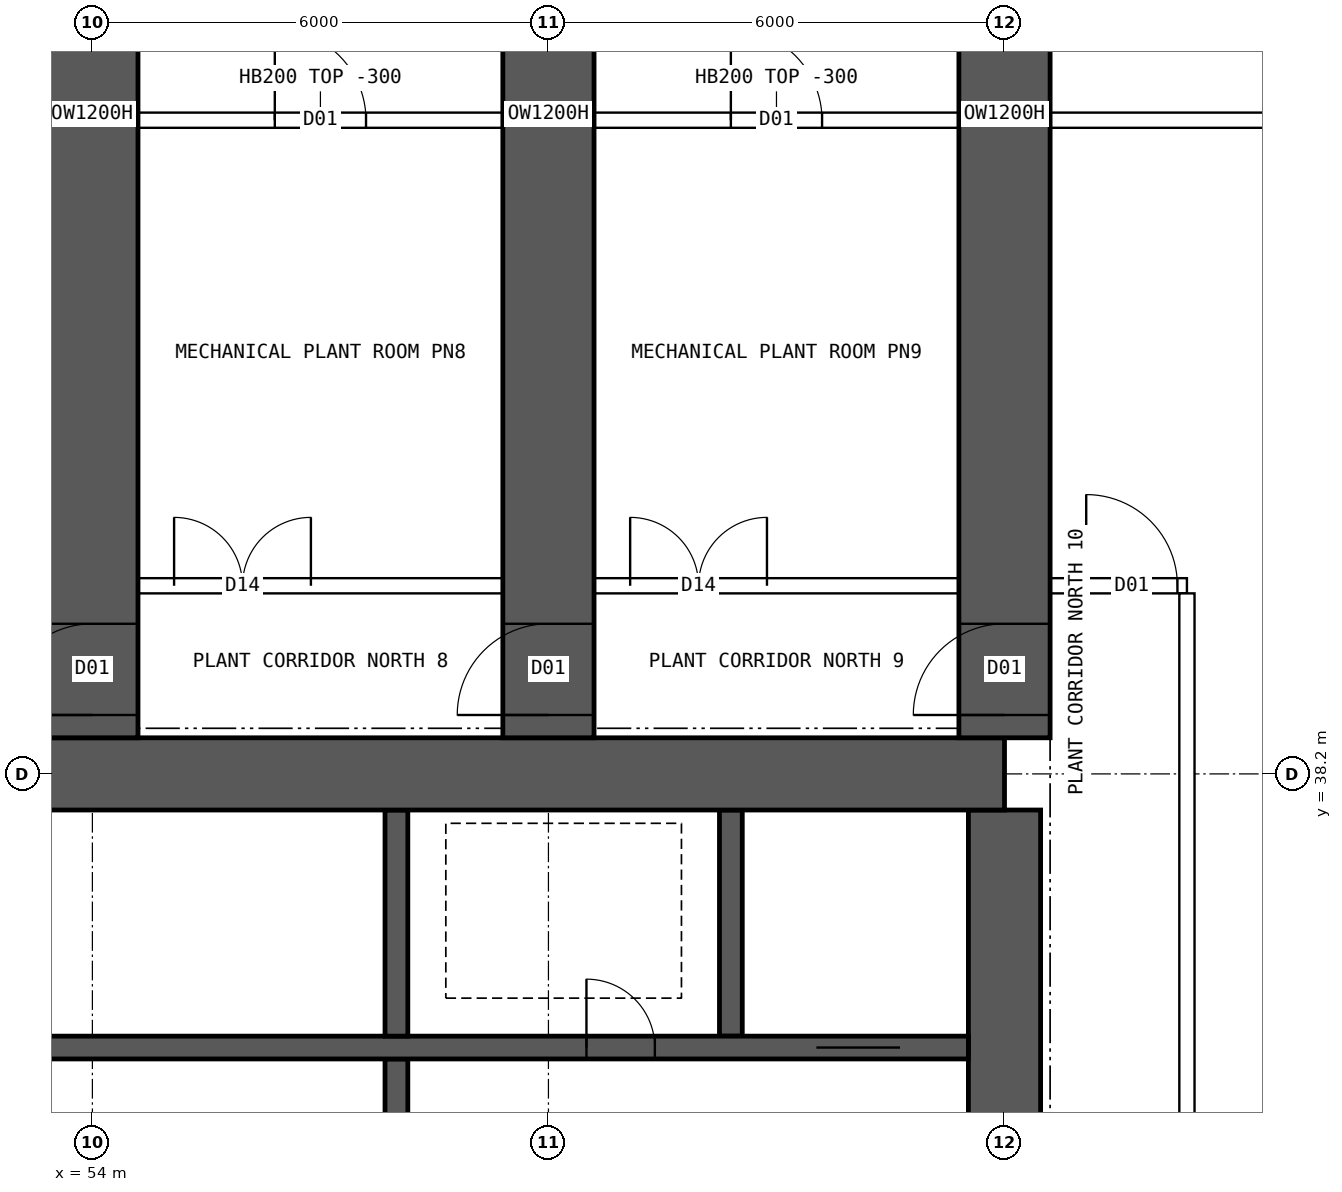
"""IFC4 building model, lengths in metres.
Left out: names, types, materials, properties, quantities, classifications, styles, units other than length and angle.
Written with IfcOpenShell. Run it as: python <this file> out.ifc"""

import sys

from ifc_helpers import new_model, si_unit, direction, frame, frame_2d, origin, place, context, subcontext, project, spatial, polyline, rectangle, outline, extrude, clip, halfspace, element, fill, save


model = new_model("IFC4")
c1 = context("Model", 3, precision=1e-05, world=origin(), true_north=direction((0.0, 1.0)))
c2 = subcontext(c1, "Body", "Model", "MODEL_VIEW")
j1 = project(units=[si_unit("LENGTHUNIT", "METRE"), si_unit("PLANEANGLEUNIT", "RADIAN")], contexts=[c1])
p1 = place(None, origin())
s1 = spatial("IfcSite", under=j1, at=p1, CompositionType="ELEMENT")
p2 = place(p1, origin())
s2 = spatial("IfcBuilding", under=s1, at=p2, CompositionType="ELEMENT")
p3 = place(p2, frame((0.0, 0.0, 133.15)))
s3 = spatial("IfcBuildingStorey", under=s2, at=p3, CompositionType="ELEMENT", Elevation=133.15)
p4 = place(p3, frame((18.0, 38.2, 0.0), z_axis=(0.0, 0.0, 1.0), x_axis=(1.0, 0.0, 0.0)))
e1 = element("IfcWall", 1, at=p4, inside=s3, PredefinedType="SHEAR", context=c2, shape_type="SweptSolid", body=[
    extrude(rectangle(XDim=48.0, YDim=0.95, at=frame_2d((24.0, 0.0))), origin(), (0.0, 0.0, 1.0), 7.2),
])
p5 = place(p3, frame((66.0, 26.275, 0.0), z_axis=(0.0, 0.0, 1.0), x_axis=(0.0, 1.0, 0.0)))
e2 = element("IfcWall", 2, at=p5, inside=s3, PredefinedType="SHEAR", context=c2, shape_type="SweptSolid", body=[
    extrude(rectangle(XDim=11.45, YDim=0.95, at=frame_2d((5.725, 0.0))), origin(), (0.0, 0.0, 1.0), 7.2),
])
p6 = place(p5, frame((5.025, 0.0, 0.0)))
e3 = element("IfcOpeningElement", 3, at=p6, cuts=e2, PredefinedType="OPENING", context=c2, shape_type="SweptSolid", body=[
    extrude(rectangle(XDim=1.2, YDim=2.1, at=frame_2d((0.6, 1.05))), frame((0.0, 0.485, 0.0), z_axis=(0.0, -1.0, 0.0), x_axis=(1.0, 0.0, 0.0)), (0.0, 0.0, 1.0), 0.97),
])
p7 = place(p3, frame((18.475, 34.6, 0.0), z_axis=(0.0, 0.0, 1.0), x_axis=(1.0, 0.0, 0.0)))
e4 = element("IfcWall", 4, at=p7, inside=s3, PredefinedType="SHEAR", context=c2, shape_type="SweptSolid", body=[
    extrude(rectangle(XDim=47.05, YDim=0.3, at=frame_2d((23.525, 0.0))), origin(), (0.0, 0.0, 1.0), 7.2),
])
p8 = place(p7, frame((0.9, 0.0, 0.0)))
e5 = element("IfcOpeningElement", 5, at=p8, cuts=e4, PredefinedType="OPENING", context=c2, shape_type="SweptSolid", body=[
    extrude(rectangle(XDim=1.1, YDim=2.1, at=frame_2d((0.55, 1.05))), frame((0.0, 0.16, 0.0), z_axis=(0.0, -1.0, 0.0), x_axis=(1.0, 0.0, 0.0)), (0.0, 0.0, 1.0), 0.32),
])
p9 = place(p7, frame((45.05, 0.0, 0.0)))
e6 = element("IfcOpeningElement", 6, at=p9, cuts=e4, PredefinedType="OPENING", context=c2, shape_type="SweptSolid", body=[
    extrude(rectangle(XDim=1.1, YDim=2.1, at=frame_2d((0.55, 1.05))), frame((0.0, 0.16, 0.0), z_axis=(0.0, -1.0, 0.0), x_axis=(1.0, 0.0, 0.0)), (0.0, 0.0, 1.0), 0.32),
])
p10 = place(p7, frame((4.125, 0.0, 0.0)))
e7 = element("IfcOpeningElement", 7, at=p10, cuts=e4, PredefinedType="OPENING", context=c2, shape_type="SweptSolid", body=[
    extrude(rectangle(XDim=0.9, YDim=2.1, at=frame_2d((0.45, 1.05))), frame((0.0, 0.16, 0.0), z_axis=(0.0, -1.0, 0.0), x_axis=(1.0, 0.0, 0.0)), (0.0, 0.0, 1.0), 0.32),
])
p11 = place(p7, frame((42.025, 0.0, 0.0)))
e8 = element("IfcOpeningElement", 8, at=p11, cuts=e4, PredefinedType="OPENING", context=c2, shape_type="SweptSolid", body=[
    extrude(rectangle(XDim=0.9, YDim=2.1, at=frame_2d((0.45, 1.05))), frame((0.0, 0.16, 0.0), z_axis=(0.0, -1.0, 0.0), x_axis=(1.0, 0.0, 0.0)), (0.0, 0.0, 1.0), 0.32),
])
p12 = place(p7, frame((8.9, 0.0, 0.0)))
e9 = element("IfcOpeningElement", 9, at=p12, cuts=e4, PredefinedType="OPENING", context=c2, shape_type="SweptSolid", body=[
    extrude(rectangle(XDim=0.9, YDim=2.1, at=frame_2d((0.45, 1.05))), frame((0.0, 0.16, 0.0), z_axis=(0.0, -1.0, 0.0), x_axis=(1.0, 0.0, 0.0)), (0.0, 0.0, 1.0), 0.32),
])
p13 = place(p7, frame((12.874, 0.0, 0.0)))
e10 = element("IfcOpeningElement", 10, at=p13, cuts=e4, PredefinedType="OPENING", context=c2, shape_type="SweptSolid", body=[
    extrude(rectangle(XDim=0.9, YDim=2.1, at=frame_2d((0.45, 1.05))), frame((0.0, 0.16, 0.0), z_axis=(0.0, -1.0, 0.0), x_axis=(1.0, 0.0, 0.0)), (0.0, 0.0, 1.0), 0.32),
])
p14 = place(p7, frame((16.521, 0.0, 0.0)))
e11 = element("IfcOpeningElement", 11, at=p14, cuts=e4, PredefinedType="OPENING", context=c2, shape_type="SweptSolid", body=[
    extrude(rectangle(XDim=0.9, YDim=2.1, at=frame_2d((0.45, 1.05))), frame((0.0, 0.16, 0.0), z_axis=(0.0, -1.0, 0.0), x_axis=(1.0, 0.0, 0.0)), (0.0, 0.0, 1.0), 0.32),
])
p15 = place(p7, frame((20.28, 0.0, 0.0)))
e12 = element("IfcOpeningElement", 12, at=p15, cuts=e4, PredefinedType="OPENING", context=c2, shape_type="SweptSolid", body=[
    extrude(rectangle(XDim=0.9, YDim=2.1, at=frame_2d((0.45, 1.05))), frame((0.0, 0.16, 0.0), z_axis=(0.0, -1.0, 0.0), x_axis=(1.0, 0.0, 0.0)), (0.0, 0.0, 1.0), 0.32),
])
p16 = place(p7, frame((24.686, 0.0, 0.0)))
e13 = element("IfcOpeningElement", 13, at=p16, cuts=e4, PredefinedType="OPENING", context=c2, shape_type="SweptSolid", body=[
    extrude(rectangle(XDim=0.9, YDim=2.1, at=frame_2d((0.45, 1.05))), frame((0.0, 0.16, 0.0), z_axis=(0.0, -1.0, 0.0), x_axis=(1.0, 0.0, 0.0)), (0.0, 0.0, 1.0), 0.32),
])
p17 = place(p7, frame((27.483, 0.0, 0.0)))
e14 = element("IfcOpeningElement", 14, at=p17, cuts=e4, PredefinedType="OPENING", context=c2, shape_type="SweptSolid", body=[
    extrude(rectangle(XDim=0.9, YDim=2.1, at=frame_2d((0.45, 1.05))), frame((0.0, 0.16, 0.0), z_axis=(0.0, -1.0, 0.0), x_axis=(1.0, 0.0, 0.0)), (0.0, 0.0, 1.0), 0.32),
])
p18 = place(p7, frame((33.604, 0.0, 0.0)))
e15 = element("IfcOpeningElement", 15, at=p18, cuts=e4, PredefinedType="OPENING", context=c2, shape_type="SweptSolid", body=[
    extrude(rectangle(XDim=0.9, YDim=2.1, at=frame_2d((0.45, 1.05))), frame((0.0, 0.16, 0.0), z_axis=(0.0, -1.0, 0.0), x_axis=(1.0, 0.0, 0.0)), (0.0, 0.0, 1.0), 0.32),
])
p19 = place(p3, frame((58.0, 30.55, 0.0), z_axis=(0.0, 0.0, 1.0), x_axis=(0.0, 1.0, 0.0)))
e16 = element("IfcWall", 16, at=p19, inside=s3, PredefinedType="SHEAR", context=c2, shape_type="SweptSolid", body=[
    extrude(rectangle(XDim=3.9, YDim=0.3, at=frame_2d((1.95, 0.0))), origin(), (0.0, 0.0, 1.0), 7.2),
])
p20 = place(p19, frame((1.4, 0.0, 0.0)))
e17 = element("IfcOpeningElement", 17, at=p20, cuts=e16, PredefinedType="OPENING", context=c2, shape_type="SweptSolid", body=[
    extrude(rectangle(XDim=1.2, YDim=2.1, at=frame_2d((0.6, 1.05))), frame((0.0, 0.16, 0.0), z_axis=(0.0, -1.0, 0.0), x_axis=(1.0, 0.0, 0.0)), (0.0, 0.0, 1.0), 0.32),
])
for number, where, z_axis, x_axis in (
    (18, (62.4, 34.75, 0.0), (0.0, 0.0, 1.0), (0.0, 1.0, 0.0)),
    (19, (58.0, 34.75, 0.0), (0.0, 0.0, 1.0), (0.0, 1.0, 0.0)),
):
    element("IfcWall", number, at=place(p3, frame(where, z_axis=z_axis, x_axis=x_axis)), inside=s3, PredefinedType="SHEAR", context=c2, shape_type="SweptSolid", body=[
        extrude(rectangle(XDim=2.975, YDim=0.3, at=frame_2d((1.488, 0.0))), origin(), (0.0, 0.0, 1.0), 7.2),
    ])
p21 = place(p3, frame((54.0, 38.675, 0.0), z_axis=(0.0, 0.0, 1.0), x_axis=(0.0, 1.0, 0.0)))
e20 = element("IfcWall", 20, at=p21, inside=s3, PredefinedType="SHEAR", context=c2, shape_type="SweptSolid", body=[
    extrude(rectangle(XDim=16.425, YDim=1.2, at=frame_2d((8.212, 0.0))), origin(), (0.0, 0.0, 1.0), 7.2),
])
p22 = place(p21, frame((0.3, 0.0, 0.0)))
e21 = element("IfcOpeningElement", 21, at=p22, cuts=e20, PredefinedType="OPENING", context=c2, shape_type="SweptSolid", body=[
    extrude(rectangle(XDim=1.2, YDim=2.1, at=frame_2d((0.6, 1.05))), frame((0.0, 0.61, 0.0), z_axis=(0.0, -1.0, 0.0), x_axis=(1.0, 0.0, 0.0)), (0.0, 0.0, 1.0), 1.22),
])
p23 = place(p3, frame((60.0, 38.675, 0.0), z_axis=(0.0, 0.0, 1.0), x_axis=(0.0, 1.0, 0.0)))
e22 = element("IfcWall", 22, at=p23, inside=s3, PredefinedType="SHEAR", context=c2, shape_type="SweptSolid", body=[
    extrude(rectangle(XDim=16.425, YDim=1.2, at=frame_2d((8.212, 0.0))), origin(), (0.0, 0.0, 1.0), 7.2),
])
p24 = place(p23, frame((0.3, 0.0, 0.0)))
e23 = element("IfcOpeningElement", 23, at=p24, cuts=e22, PredefinedType="OPENING", context=c2, shape_type="SweptSolid", body=[
    extrude(rectangle(XDim=1.2, YDim=2.1, at=frame_2d((0.6, 1.05))), frame((0.0, 0.61, 0.0), z_axis=(0.0, -1.0, 0.0), x_axis=(1.0, 0.0, 0.0)), (0.0, 0.0, 1.0), 1.22),
])
p25 = place(p3, frame((66.0, 38.675, 0.0), z_axis=(0.0, 0.0, 1.0), x_axis=(0.0, 1.0, 0.0)))
e24 = element("IfcWall", 24, at=p25, inside=s3, PredefinedType="SHEAR", context=c2, shape_type="SweptSolid", body=[
    extrude(rectangle(XDim=16.425, YDim=1.2, at=frame_2d((8.212, 0.0))), origin(), (0.0, 0.0, 1.0), 7.2),
])
p26 = place(p25, frame((0.3, 0.0, 0.0)))
e25 = element("IfcOpeningElement", 25, at=p26, cuts=e24, PredefinedType="OPENING", context=c2, shape_type="SweptSolid", body=[
    extrude(rectangle(XDim=1.2, YDim=2.1, at=frame_2d((0.6, 1.05))), frame((0.0, 0.61, 0.0), z_axis=(0.0, -1.0, 0.0), x_axis=(1.0, 0.0, 0.0)), (0.0, 0.0, 1.0), 1.22),
])
p27 = place(p25, frame((11.375, 0.0, 0.0)))
e26 = element("IfcOpeningElement", 26, at=p27, cuts=e24, PredefinedType="OPENING", context=c2, shape_type="SweptSolid", body=[
    extrude(rectangle(XDim=1.2, YDim=2.1, at=frame_2d((0.6, 1.05))), frame((0.0, 0.61, 0.0), z_axis=(0.0, -1.0, 0.0), x_axis=(1.0, 0.0, 0.0)), (0.0, 0.0, 1.0), 1.22),
])
p28 = place(p3, frame((15.6, 40.675, 0.0), z_axis=(0.0, 0.0, 1.0), x_axis=(1.0, 0.0, 0.0)))
e27 = element("IfcWall", 27, at=p28, inside=s3, PredefinedType="SOLIDWALL", context=c2, shape_type="SweptSolid", body=[
    extrude(rectangle(XDim=52.8, YDim=0.2, at=frame_2d((26.4, 0.0))), origin(), (0.0, 0.0, 1.0), 6.9),
])
p29 = place(p28, frame((0.6, 0.0, 0.0)))
e28 = element("IfcOpeningElement", 28, at=p29, cuts=e27, PredefinedType="OPENING", context=c2, shape_type="SweptSolid", body=[
    extrude(rectangle(XDim=1.2, YDim=2.1, at=frame_2d((0.6, 1.05))), frame((0.0, 0.11, 0.0), z_axis=(0.0, -1.0, 0.0), x_axis=(1.0, 0.0, 0.0)), (0.0, 0.0, 1.0), 0.22),
])
p30 = place(p28, frame((3.475, 0.0, 0.0)))
e29 = element("IfcOpeningElement", 29, at=p30, cuts=e27, PredefinedType="OPENING", context=c2, shape_type="SweptSolid", body=[
    extrude(rectangle(XDim=1.8, YDim=2.4, at=frame_2d((0.9, 1.2))), frame((0.0, 0.11, 0.0), z_axis=(0.0, -1.0, 0.0), x_axis=(1.0, 0.0, 0.0)), (0.0, 0.0, 1.0), 0.22),
])
p31 = place(p28, frame((9.475, 0.0, 0.0)))
e30 = element("IfcOpeningElement", 30, at=p31, cuts=e27, PredefinedType="OPENING", context=c2, shape_type="SweptSolid", body=[
    extrude(rectangle(XDim=1.8, YDim=2.4, at=frame_2d((0.9, 1.2))), frame((0.0, 0.11, 0.0), z_axis=(0.0, -1.0, 0.0), x_axis=(1.0, 0.0, 0.0)), (0.0, 0.0, 1.0), 0.22),
])
p32 = place(p28, frame((15.475, 0.0, 0.0)))
e31 = element("IfcOpeningElement", 31, at=p32, cuts=e27, PredefinedType="OPENING", context=c2, shape_type="SweptSolid", body=[
    extrude(rectangle(XDim=1.8, YDim=2.4, at=frame_2d((0.9, 1.2))), frame((0.0, 0.11, 0.0), z_axis=(0.0, -1.0, 0.0), x_axis=(1.0, 0.0, 0.0)), (0.0, 0.0, 1.0), 0.22),
])
p33 = place(p28, frame((21.475, 0.0, 0.0)))
e32 = element("IfcOpeningElement", 32, at=p33, cuts=e27, PredefinedType="OPENING", context=c2, shape_type="SweptSolid", body=[
    extrude(rectangle(XDim=1.8, YDim=2.4, at=frame_2d((0.9, 1.2))), frame((0.0, 0.11, 0.0), z_axis=(0.0, -1.0, 0.0), x_axis=(1.0, 0.0, 0.0)), (0.0, 0.0, 1.0), 0.22),
])
p34 = place(p28, frame((27.475, 0.0, 0.0)))
e33 = element("IfcOpeningElement", 33, at=p34, cuts=e27, PredefinedType="OPENING", context=c2, shape_type="SweptSolid", body=[
    extrude(rectangle(XDim=1.8, YDim=2.4, at=frame_2d((0.9, 1.2))), frame((0.0, 0.11, 0.0), z_axis=(0.0, -1.0, 0.0), x_axis=(1.0, 0.0, 0.0)), (0.0, 0.0, 1.0), 0.22),
])
p35 = place(p28, frame((33.475, 0.0, 0.0)))
e34 = element("IfcOpeningElement", 34, at=p35, cuts=e27, PredefinedType="OPENING", context=c2, shape_type="SweptSolid", body=[
    extrude(rectangle(XDim=1.8, YDim=2.4, at=frame_2d((0.9, 1.2))), frame((0.0, 0.11, 0.0), z_axis=(0.0, -1.0, 0.0), x_axis=(1.0, 0.0, 0.0)), (0.0, 0.0, 1.0), 0.22),
])
p36 = place(p28, frame((39.475, 0.0, 0.0)))
e35 = element("IfcOpeningElement", 35, at=p36, cuts=e27, PredefinedType="OPENING", context=c2, shape_type="SweptSolid", body=[
    extrude(rectangle(XDim=1.8, YDim=2.4, at=frame_2d((0.9, 1.2))), frame((0.0, 0.11, 0.0), z_axis=(0.0, -1.0, 0.0), x_axis=(1.0, 0.0, 0.0)), (0.0, 0.0, 1.0), 0.22),
])
p37 = place(p28, frame((45.475, 0.0, 0.0)))
e36 = element("IfcOpeningElement", 36, at=p37, cuts=e27, PredefinedType="OPENING", context=c2, shape_type="SweptSolid", body=[
    extrude(rectangle(XDim=1.8, YDim=2.4, at=frame_2d((0.9, 1.2))), frame((0.0, 0.11, 0.0), z_axis=(0.0, -1.0, 0.0), x_axis=(1.0, 0.0, 0.0)), (0.0, 0.0, 1.0), 0.22),
])
p38 = place(p28, frame((51.475, 0.0, 0.0)))
e37 = element("IfcOpeningElement", 37, at=p38, cuts=e27, PredefinedType="OPENING", context=c2, shape_type="SweptSolid", body=[
    extrude(rectangle(XDim=1.2, YDim=2.1, at=frame_2d((0.6, 1.05))), frame((0.0, 0.11, 0.0), z_axis=(0.0, -1.0, 0.0), x_axis=(1.0, 0.0, 0.0)), (0.0, 0.0, 1.0), 0.22),
])
p39 = place(p3, frame((68.4, 23.425, 0.0), z_axis=(0.0, 0.0, 1.0), x_axis=(0.0, 1.0, 0.0)))
e38 = element("IfcWall", 38, at=p39, inside=s3, PredefinedType="SOLIDWALL", context=c2, shape_type="SweptSolid", body=[
    extrude(rectangle(XDim=17.15, YDim=0.2, at=frame_2d((8.575, 0.0))), origin(), (0.0, 0.0, 1.0), 6.9),
])
p40 = place(p3, frame((48.475, 46.8, 0.0), z_axis=(0.0, 0.0, 1.0), x_axis=(1.0, 0.0, 0.0)))
e39 = element("IfcWall", 39, at=p40, inside=s3, PredefinedType="SOLIDWALL", context=c2, shape_type="SweptSolid", body=[
    extrude(rectangle(XDim=5.05, YDim=0.2, at=frame_2d((2.525, 0.0))), origin(), (0.0, 0.0, 1.0), 6.9),
])
p41 = place(p40, frame((1.925, 0.0, 0.0)))
e40 = element("IfcOpeningElement", 40, at=p41, cuts=e39, PredefinedType="OPENING", context=c2, shape_type="SweptSolid", body=[
    extrude(rectangle(XDim=1.2, YDim=2.1, at=frame_2d((0.6, 1.05))), frame((0.0, 0.11, 0.0), z_axis=(0.0, -1.0, 0.0), x_axis=(1.0, 0.0, 0.0)), (0.0, 0.0, 1.0), 0.22),
])
p42 = place(p3, frame((54.475, 46.8, 0.0), z_axis=(0.0, 0.0, 1.0), x_axis=(1.0, 0.0, 0.0)))
e41 = element("IfcWall", 41, at=p42, inside=s3, PredefinedType="SOLIDWALL", context=c2, shape_type="SweptSolid", body=[
    extrude(rectangle(XDim=5.05, YDim=0.2, at=frame_2d((2.525, 0.0))), origin(), (0.0, 0.0, 1.0), 6.9),
])
p43 = place(p42, frame((1.925, 0.0, 0.0)))
e42 = element("IfcOpeningElement", 42, at=p43, cuts=e41, PredefinedType="OPENING", context=c2, shape_type="SweptSolid", body=[
    extrude(rectangle(XDim=1.2, YDim=2.1, at=frame_2d((0.6, 1.05))), frame((0.0, 0.11, 0.0), z_axis=(0.0, -1.0, 0.0), x_axis=(1.0, 0.0, 0.0)), (0.0, 0.0, 1.0), 0.22),
])
p44 = place(p3, frame((60.475, 46.8, 0.0), z_axis=(0.0, 0.0, 1.0), x_axis=(1.0, 0.0, 0.0)))
e43 = element("IfcWall", 43, at=p44, inside=s3, PredefinedType="SOLIDWALL", context=c2, shape_type="SweptSolid", body=[
    extrude(rectangle(XDim=5.05, YDim=0.2, at=frame_2d((2.525, 0.0))), origin(), (0.0, 0.0, 1.0), 6.9),
])
p45 = place(p44, frame((1.925, 0.0, 0.0)))
e44 = element("IfcOpeningElement", 44, at=p45, cuts=e43, PredefinedType="OPENING", context=c2, shape_type="SweptSolid", body=[
    extrude(rectangle(XDim=1.2, YDim=2.1, at=frame_2d((0.6, 1.05))), frame((0.0, 0.11, 0.0), z_axis=(0.0, -1.0, 0.0), x_axis=(1.0, 0.0, 0.0)), (0.0, 0.0, 1.0), 0.22),
])
p46 = place(p3, frame((66.475, 46.8, 0.0), z_axis=(0.0, 0.0, 1.0), x_axis=(1.0, 0.0, 0.0)))
e45 = element("IfcWall", 45, at=p46, inside=s3, PredefinedType="SOLIDWALL", context=c2, shape_type="Clipping", body=[
    clip(clip(extrude(outline(polyline([(-0.03, 0.0), (8.648, 0.0), (8.648, 6.9), (5.827, 6.9), (5.825, 6.45), (5.227, 6.45), (5.225, 6.9), (-0.03, 6.9), (-0.03, 0.0)])), frame((0.0, 0.1, 0.0), z_axis=(0.0, -1.0, 0.0), x_axis=(1.0, 0.0, 0.0)), (0.0, 0.0, 1.0), 0.2), halfspace(frame((0.0, 0.0, 0.0), z_axis=(-1.0, 0.0, 0.0)), False)), halfspace(frame((8.618, 0.0, 0.0), z_axis=(0.98078778892, 0.195077710428, 0.0)), False)),
])
p47 = place(p46, frame((3.708, 0.0, 0.0)))
e46 = element("IfcOpeningElement", 46, at=p47, cuts=e45, PredefinedType="OPENING", context=c2, shape_type="SweptSolid", body=[
    extrude(rectangle(XDim=1.2, YDim=2.1, at=frame_2d((0.6, 1.05))), frame((0.0, 0.11, 0.0), z_axis=(0.0, -1.0, 0.0), x_axis=(1.0, 0.0, 0.0)), (0.0, 0.0, 1.0), 0.22),
])
p48 = place(p9, origin())
e47 = element("IfcDoor", 47, at=p48, inside=s3, OperationType="DOUBLE_DOOR_SLIDING", PredefinedType="DOOR", context=c2, shape_type="SweptSolid", body=[
    extrude(rectangle(XDim=1.1, YDim=2.1, at=frame_2d((0.55, 1.05))), frame((0.0, 0.025, 0.0), z_axis=(0.0, -1.0, 0.0), x_axis=(1.0, 0.0, 0.0)), (0.0, 0.0, 1.0), 0.05),
])
fill(e6, e47)
p49 = place(p11, origin())
e48 = element("IfcDoor", 48, at=p49, inside=s3, OperationType="SINGLE_SWING_LEFT", PredefinedType="DOOR", context=c2, shape_type="SweptSolid", body=[
    extrude(rectangle(XDim=0.9, YDim=2.1, at=frame_2d((0.45, 1.05))), frame((0.0, 0.025, 0.0), z_axis=(0.0, -1.0, 0.0), x_axis=(1.0, 0.0, 0.0)), (0.0, 0.0, 1.0), 0.05),
])
fill(e8, e48)
p50 = place(p43, origin())
e49 = element("IfcDoor", 49, at=p50, inside=s3, OperationType="SINGLE_SWING_LEFT", PredefinedType="DOOR", context=c2, shape_type="SweptSolid", body=[
    extrude(rectangle(XDim=1.2, YDim=2.1, at=frame_2d((0.6, 1.05))), frame((0.0, 0.025, 0.0), z_axis=(0.0, -1.0, 0.0), x_axis=(1.0, 0.0, 0.0)), (0.0, 0.0, 1.0), 0.05),
])
fill(e42, e49)
p51 = place(p45, origin())
e50 = element("IfcDoor", 50, at=p51, inside=s3, OperationType="SINGLE_SWING_LEFT", PredefinedType="DOOR", context=c2, shape_type="SweptSolid", body=[
    extrude(rectangle(XDim=1.2, YDim=2.1, at=frame_2d((0.6, 1.05))), frame((0.0, 0.025, 0.0), z_axis=(0.0, -1.0, 0.0), x_axis=(1.0, 0.0, 0.0)), (0.0, 0.0, 1.0), 0.05),
])
fill(e44, e50)
p52 = place(p36, origin())
e51 = element("IfcDoor", 51, at=p52, inside=s3, OperationType="DOUBLE_DOOR_SINGLE_SWING", PredefinedType="DOOR", context=c2, shape_type="SweptSolid", body=[
    extrude(rectangle(XDim=1.8, YDim=2.4, at=frame_2d((0.9, 1.2))), frame((0.0, 0.025, 0.0), z_axis=(0.0, -1.0, 0.0), x_axis=(1.0, 0.0, 0.0)), (0.0, 0.0, 1.0), 0.05),
])
fill(e35, e51)
p53 = place(p37, origin())
e52 = element("IfcDoor", 52, at=p53, inside=s3, OperationType="DOUBLE_DOOR_SINGLE_SWING", PredefinedType="DOOR", context=c2, shape_type="SweptSolid", body=[
    extrude(rectangle(XDim=1.8, YDim=2.4, at=frame_2d((0.9, 1.2))), frame((0.0, 0.025, 0.0), z_axis=(0.0, -1.0, 0.0), x_axis=(1.0, 0.0, 0.0)), (0.0, 0.0, 1.0), 0.05),
])
fill(e36, e52)
p54 = place(p38, origin())
e53 = element("IfcDoor", 53, at=p54, inside=s3, OperationType="SINGLE_SWING_LEFT", PredefinedType="DOOR", context=c2, shape_type="SweptSolid", body=[
    extrude(rectangle(XDim=1.2, YDim=2.1, at=frame_2d((0.6, 1.05))), frame((0.0, 0.025, 0.0), z_axis=(0.0, -1.0, 0.0), x_axis=(1.0, 0.0, 0.0)), (0.0, 0.0, 1.0), 0.05),
])
fill(e37, e53)
p55 = place(p22, origin())
e54 = element("IfcDoor", 54, at=p55, inside=s3, OperationType="SINGLE_SWING_LEFT", PredefinedType="DOOR", context=c2, shape_type="SweptSolid", body=[
    extrude(rectangle(XDim=1.2, YDim=2.1, at=frame_2d((0.6, 1.05))), frame((0.0, 0.025, 0.0), z_axis=(0.0, -1.0, 0.0), x_axis=(1.0, 0.0, 0.0)), (0.0, 0.0, 1.0), 0.05),
])
fill(e21, e54)
p56 = place(p24, origin())
e55 = element("IfcDoor", 55, at=p56, inside=s3, OperationType="SINGLE_SWING_LEFT", PredefinedType="DOOR", context=c2, shape_type="SweptSolid", body=[
    extrude(rectangle(XDim=1.2, YDim=2.1, at=frame_2d((0.6, 1.05))), frame((0.0, 0.025, 0.0), z_axis=(0.0, -1.0, 0.0), x_axis=(1.0, 0.0, 0.0)), (0.0, 0.0, 1.0), 0.05),
])
fill(e23, e55)
p57 = place(p26, origin())
e56 = element("IfcDoor", 56, at=p57, inside=s3, OperationType="SINGLE_SWING_LEFT", PredefinedType="DOOR", context=c2, shape_type="SweptSolid", body=[
    extrude(rectangle(XDim=1.2, YDim=2.1, at=frame_2d((0.6, 1.05))), frame((0.0, 0.025, 0.0), z_axis=(0.0, -1.0, 0.0), x_axis=(1.0, 0.0, 0.0)), (0.0, 0.0, 1.0), 0.05),
])
fill(e25, e56)
save(model, sys.argv[1])
